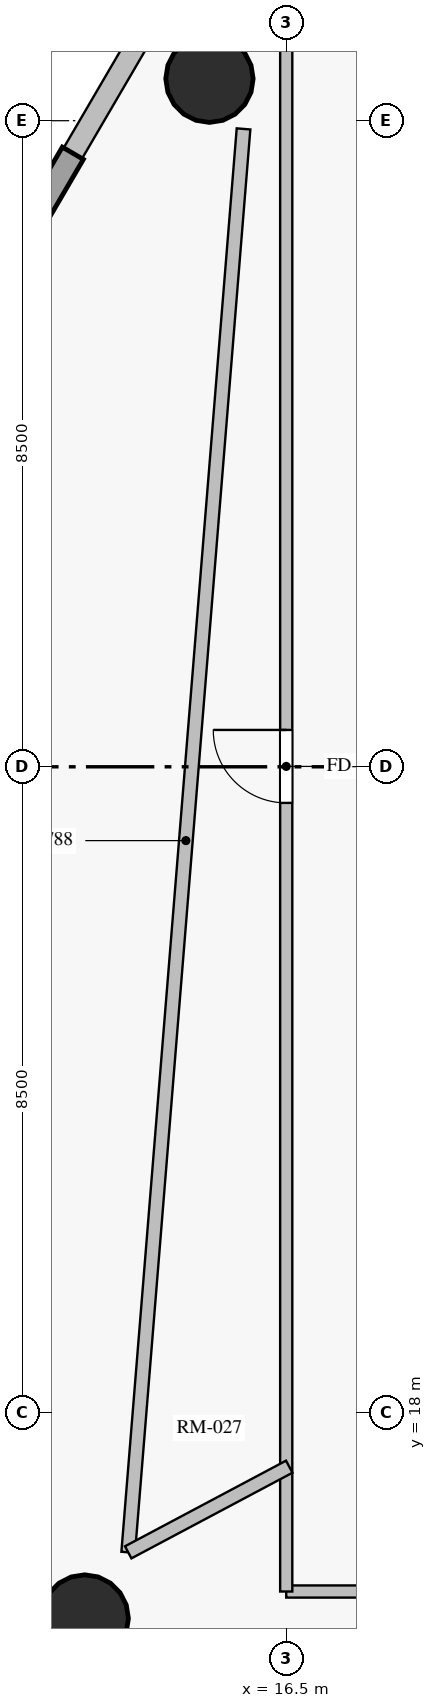
"""IFC4 building model, lengths in metres.
Left out: names, types, materials, properties, quantities, classifications, styles, units other than length and angle.
Written with IfcOpenShell. Run it as: python <this file> out.ifc"""

import sys

from ifc_helpers import new_model, si_unit, direction, frame, frame_2d, origin, origin_with_axes, origin_2d, place, context, subcontext, project, spatial, rectangle, circle, extrude, source, transform, mapped, element, fill, save


model = new_model("IFC4")
c1 = context("Model", 3, precision=1e-05, world=origin(), true_north=direction((0.0, 1.0)))
c2 = subcontext(c1, "Body", "Model", "MODEL_VIEW")
j1 = project(units=[si_unit("LENGTHUNIT", "METRE"), si_unit("PLANEANGLEUNIT", "RADIAN")], contexts=[c1])
p1 = place(None, origin())
s1 = spatial("IfcSite", under=j1, at=p1, CompositionType="ELEMENT")
p2 = place(p1, origin())
s2 = spatial("IfcBuilding", under=s1, at=p2, CompositionType="ELEMENT")
p3 = place(p2, frame((0.0, 0.0, 268.75)))
s3 = spatial("IfcBuildingStorey", under=s2, at=p3, CompositionType="ELEMENT", Elevation=268.75)
m1 = source(origin_with_axes(), c2, "Body", "SweptSolid", [
    extrude(circle(Radius=0.575, at=origin_2d()), origin(), (0.0, 0.0, 1.0), 4.65),
])
for number, where, z_axis, x_axis in (
    (1, (15.49, 35.552, 0.0), (0.0, 0.0, 1.0), (1.0, 0.0, 0.0)),
    (2, (13.849, 15.295, 0.0), (0.0, 0.0, 1.0), (1.0, 0.0, 0.0)),
):
    element("IfcColumn", number, at=place(p3, frame(where, z_axis=z_axis, x_axis=x_axis)), inside=s3, PredefinedType="COLUMN", context=c2, shape_type="MappedRepresentation", body=[
        mapped(m1, transform((0.0, 0.0, 0.0), scale=1.0)),
    ])
p4 = place(p3, frame((9.54, 18.654, 0.0), z_axis=(0.0, 0.0, 1.0), x_axis=(0.548722318378, -0.836004675414, 0.0)))
e3 = element("IfcWall", 3, at=p4, inside=s3, PredefinedType="SOLIDWALL", context=c2, shape_type="SweptSolid", body=[
    extrude(rectangle(XDim=7.69, YDim=0.28, at=frame_2d((3.845, 0.0))), origin(), (0.0, 0.0, 1.0), 4.375),
])
p5 = place(p3, frame((15.02, 36.843, 0.0), z_axis=(0.0, 0.0, 1.0), x_axis=(-0.504536909081, -0.863390124669, 0.0)))
e4 = element("IfcWall", 4, at=p5, inside=s3, PredefinedType="SOLIDWALL", context=c2, shape_type="SweptSolid", body=[
    extrude(rectangle(XDim=8.661, YDim=0.28, at=frame_2d((4.33, 0.0))), origin(), (0.0, 0.0, 1.0), 4.375),
])
p6 = place(p3, frame((40.35, 15.65, 0.0), z_axis=(0.0, 0.0, 1.0), x_axis=(-1.0, 0.0, 0.0)))
e5 = element("IfcWall", 5, at=p6, inside=s3, PredefinedType="PARTITIONING", context=c2, shape_type="SweptSolid", body=[
    extrude(rectangle(XDim=23.85, YDim=0.16, at=frame_2d((11.925, 0.0))), origin(), (0.0, 0.0, 1.0), 3.475),
])
p7 = place(p6, frame((15.028, 0.0, 0.0)))
e6 = element("IfcOpeningElement", 6, at=p7, cuts=e5, PredefinedType="OPENING", context=c2, shape_type="SweptSolid", body=[
    extrude(rectangle(XDim=0.96, YDim=2.15, at=frame_2d((0.48, 1.075))), frame((0.0, 0.09, 0.0), z_axis=(0.0, -1.0, 0.0), x_axis=(1.0, 0.0, 0.0)), (0.0, 0.0, 1.0), 0.18),
])
p8 = place(p6, frame((11.26, 0.0, 0.0)))
e7 = element("IfcOpeningElement", 7, at=p8, cuts=e5, PredefinedType="OPENING", context=c2, shape_type="SweptSolid", body=[
    extrude(rectangle(XDim=0.96, YDim=2.15, at=frame_2d((0.48, 1.075))), frame((0.0, 0.09, 0.0), z_axis=(0.0, -1.0, 0.0), x_axis=(1.0, 0.0, 0.0)), (0.0, 0.0, 1.0), 0.18),
])
p9 = place(p3, frame((16.5, 15.65, 0.0), z_axis=(0.0, 0.0, 1.0), x_axis=(0.0, 1.0, 0.0)))
e8 = element("IfcWall", 8, at=p9, inside=s3, PredefinedType="PARTITIONING", context=c2, shape_type="SweptSolid", body=[
    extrude(rectangle(XDim=21.7, YDim=0.16, at=frame_2d((10.85, 0.0))), origin(), (0.0, 0.0, 1.0), 3.475),
])
p10 = place(p9, frame((10.375, 0.0, 0.0)))
e9 = element("IfcOpeningElement", 9, at=p10, cuts=e8, PredefinedType="OPENING", context=c2, shape_type="SweptSolid", body=[
    extrude(rectangle(XDim=0.96, YDim=2.15, at=frame_2d((0.48, 1.075))), frame((0.0, 0.09, 0.0), z_axis=(0.0, -1.0, 0.0), x_axis=(1.0, 0.0, 0.0)), (0.0, 0.0, 1.0), 0.18),
])
p11 = place(p3, frame((14.421, 16.166, 0.0), z_axis=(0.0, 0.0, 1.0), x_axis=(0.080748179949, 0.996734534084, 0.0)))
e10 = element("IfcWall", 10, at=p11, inside=s3, PredefinedType="PARTITIONING", context=c2, shape_type="SweptSolid", body=[
    extrude(rectangle(XDim=18.788, YDim=0.18, at=frame_2d((9.394, 0.0))), origin(), (0.0, 0.0, 1.0), 3.475),
])
p12 = place(p3, frame((16.54, 17.292, 0.0), z_axis=(0.0, 0.0, 1.0), x_axis=(-0.882954950229, -0.469457725323, 0.0)))
e11 = element("IfcWall", 11, at=p12, inside=s3, PredefinedType="PARTITIONING", context=c2, shape_type="SweptSolid", body=[
    extrude(rectangle(XDim=2.399, YDim=0.18, at=frame_2d((1.2, 0.0))), origin(), (0.0, 0.0, 1.0), 3.475),
])
m2 = source(origin_with_axes(), c2, "Body", "SweptSolid", [
    extrude(rectangle(XDim=0.96, YDim=2.15, at=frame_2d((0.48, 1.075))), frame((0.0, 0.025, 0.0), z_axis=(0.0, -1.0, 0.0), x_axis=(1.0, 0.0, 0.0)), (0.0, 0.0, 1.0), 0.05),
])
p13 = place(p10, origin())
e12 = element("IfcDoor", 12, at=p13, inside=s3, OperationType="SINGLE_SWING_RIGHT", PredefinedType="DOOR", context=c2, shape_type="MappedRepresentation", body=[
    mapped(m2, transform((0.0, 0.0, 0.0), scale=1.0)),
])
fill(e9, e12)
save(model, sys.argv[1])
